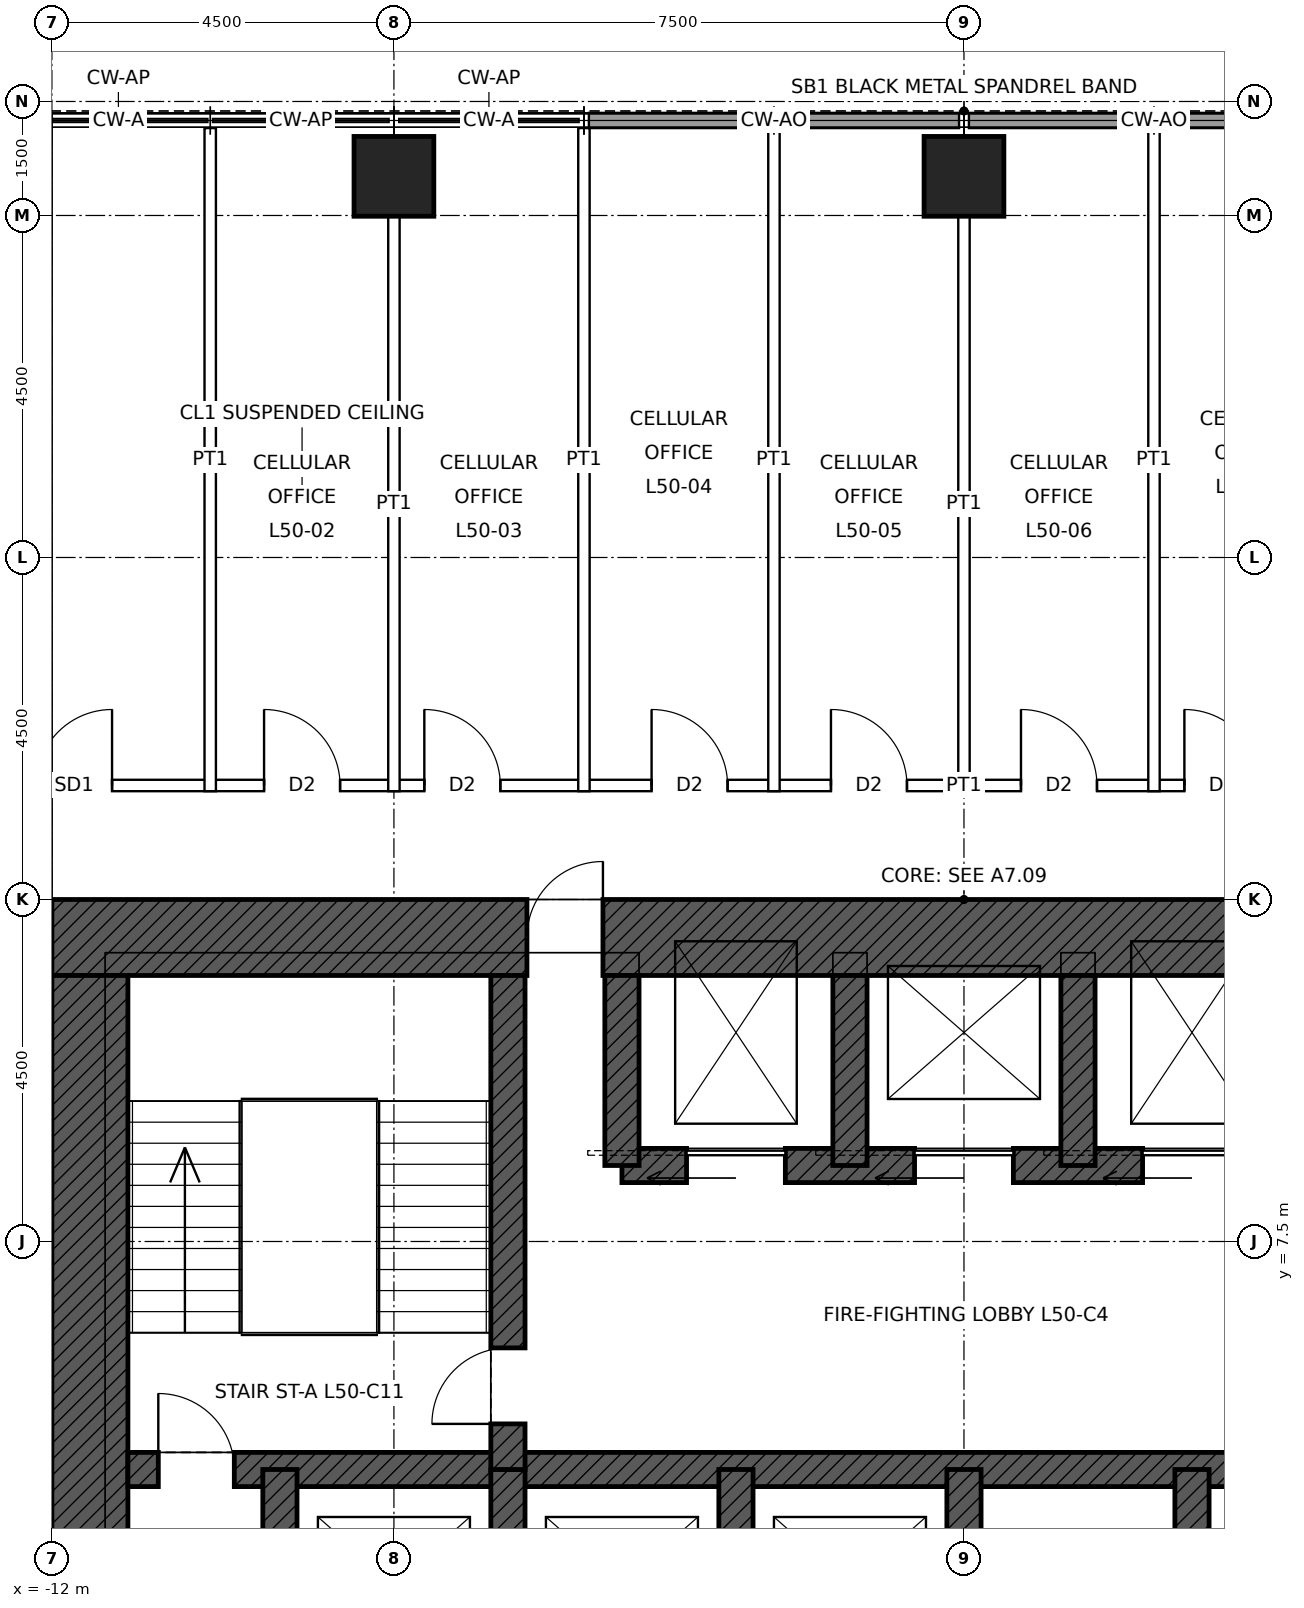
"""IFC4 building model, lengths in metres.
Left out: names, types, materials, properties, quantities, classifications, styles, units other than length and angle.
Written with IfcOpenShell. Run it as: python <this file> out.ifc"""

import sys

from ifc_helpers import new_model, si_unit, direction, frame, frame_2d, origin, origin_2d, place, context, subcontext, project, spatial, rectangle, hollow_rectangle, extrude, element, fill, save


model = new_model("IFC4")
c1 = context("Model", 3, precision=1e-05, world=origin(), true_north=direction((0.0, 1.0)))
c2 = subcontext(c1, "Body", "Model", "MODEL_VIEW")
j1 = project(units=[si_unit("LENGTHUNIT", "METRE"), si_unit("PLANEANGLEUNIT", "RADIAN")], contexts=[c1])
p1 = place(None, origin())
s1 = spatial("IfcSite", under=j1, at=p1, CompositionType="ELEMENT")
p2 = place(p1, origin())
s2 = spatial("IfcBuilding", under=s1, at=p2, CompositionType="ELEMENT")
p3 = place(p2, frame((0.0, 0.0, 233.9)))
s3 = spatial("IfcBuildingStorey", under=s2, at=p3, CompositionType="ELEMENT", Elevation=233.9)
for number, where, z_axis, x_axis in (
    (1, (-7.5, 21.515, 0.0), (0.0, 0.0, 1.0), (1.0, 0.0, 0.0)),
    (2, (0.0, 21.515, 0.0), (0.0, 0.0, 1.0), (1.0, 0.0, 0.0)),
):
    element("IfcColumn", number, at=place(p3, frame(where, z_axis=z_axis, x_axis=x_axis)), inside=s3, PredefinedType="COLUMN", context=c2, shape_type="SweptSolid", body=[
        extrude(hollow_rectangle(XDim=1.05, YDim=1.05, WallThickness=0.07, at=origin_2d()), origin(), (0.0, 0.0, 1.0), 4.0),
    ])
p4 = place(p3, frame((-12.0, 11.5, 0.0), z_axis=(0.0, 0.0, 1.0), x_axis=(1.0, 0.0, 0.0)))
e3 = element("IfcWall", 3, at=p4, inside=s3, PredefinedType="SHEAR", context=c2, shape_type="SweptSolid", body=[
    extrude(rectangle(XDim=24.0, YDim=1.0, at=frame_2d((12.0, 0.0))), origin(), (0.0, 0.0, 1.0), 4.0),
])
p5 = place(p4, frame((6.25, 0.0, 0.0)))
e4 = element("IfcOpeningElement", 4, at=p5, cuts=e3, PredefinedType="OPENING", context=c2, shape_type="SweptSolid", body=[
    extrude(rectangle(XDim=1.0, YDim=2.4, at=frame_2d((0.5, 1.2))), frame((0.0, 0.51, 0.0), z_axis=(0.0, -1.0, 0.0), x_axis=(1.0, 0.0, 0.0)), (0.0, 0.0, 1.0), 1.02),
])
p6 = place(p4, frame((16.75, 0.0, 0.0)))
e5 = element("IfcOpeningElement", 5, at=p6, cuts=e3, PredefinedType="OPENING", context=c2, shape_type="SweptSolid", body=[
    extrude(rectangle(XDim=1.0, YDim=2.4, at=frame_2d((0.5, 1.2))), frame((0.0, 0.51, 0.0), z_axis=(0.0, -1.0, 0.0), x_axis=(1.0, 0.0, 0.0)), (0.0, 0.0, 1.0), 1.02),
])
p7 = place(p3, frame((-11.5, -11.0, 0.0), z_axis=(0.0, 0.0, 1.0), x_axis=(0.0, 1.0, 0.0)))
e6 = element("IfcWall", 6, at=p7, inside=s3, PredefinedType="SHEAR", context=c2, shape_type="SweptSolid", body=[
    extrude(rectangle(XDim=22.0, YDim=1.0, at=frame_2d((11.0, 0.0))), origin(), (0.0, 0.0, 1.0), 4.0),
])
p8 = place(p7, frame((10.5, 0.0, 0.0)))
e7 = element("IfcOpeningElement", 7, at=p8, cuts=e6, PredefinedType="OPENING", context=c2, shape_type="SweptSolid", body=[
    extrude(rectangle(XDim=1.0, YDim=2.4, at=frame_2d((0.5, 1.2))), frame((0.0, 0.51, 0.0), z_axis=(0.0, -1.0, 0.0), x_axis=(1.0, 0.0, 0.0)), (0.0, 0.0, 1.0), 1.02),
])
p9 = place(p3, frame((-11.0, 4.5, 0.0), z_axis=(0.0, 0.0, 1.0), x_axis=(1.0, 0.0, 0.0)))
e8 = element("IfcWall", 8, at=p9, inside=s3, PredefinedType="SHEAR", context=c2, shape_type="SweptSolid", body=[
    extrude(rectangle(XDim=22.0, YDim=0.45, at=frame_2d((11.0, 0.0))), origin(), (0.0, 0.0, 1.0), 4.0),
])
p10 = place(p9, frame((0.4, 0.0, 0.0)))
e9 = element("IfcOpeningElement", 9, at=p10, cuts=e8, PredefinedType="OPENING", context=c2, shape_type="SweptSolid", body=[
    extrude(rectangle(XDim=1.0, YDim=2.1, at=frame_2d((0.5, 1.05))), frame((0.0, 0.235, 0.0), z_axis=(0.0, -1.0, 0.0), x_axis=(1.0, 0.0, 0.0)), (0.0, 0.0, 1.0), 0.47),
])
p11 = place(p9, frame((20.6, 0.0, 0.0)))
e10 = element("IfcOpeningElement", 10, at=p11, cuts=e8, PredefinedType="OPENING", context=c2, shape_type="SweptSolid", body=[
    extrude(rectangle(XDim=1.0, YDim=2.1, at=frame_2d((0.5, 1.05))), frame((0.0, 0.235, 0.0), z_axis=(0.0, -1.0, 0.0), x_axis=(1.0, 0.0, 0.0)), (0.0, 0.0, 1.0), 0.47),
])
p12 = place(p3, frame((-4.5, 8.5, 0.0), z_axis=(0.0, 0.0, 1.0), x_axis=(1.0, 0.0, 0.0)))
e11 = element("IfcWall", 11, at=p12, inside=s3, PredefinedType="SHEAR", context=c2, shape_type="SweptSolid", body=[
    extrude(rectangle(XDim=9.0, YDim=0.45, at=frame_2d((4.5, 0.0))), origin(), (0.0, 0.0, 1.0), 4.0),
])
p13 = place(p12, frame((0.85, 0.0, 0.0)))
e12 = element("IfcOpeningElement", 12, at=p13, cuts=e11, PredefinedType="OPENING", context=c2, shape_type="SweptSolid", body=[
    extrude(rectangle(XDim=1.3, YDim=2.4, at=frame_2d((0.65, 1.2))), frame((0.0, 0.235, 0.0), z_axis=(0.0, -1.0, 0.0), x_axis=(1.0, 0.0, 0.0)), (0.0, 0.0, 1.0), 0.47),
])
p14 = place(p12, frame((6.85, 0.0, 0.0)))
e13 = element("IfcOpeningElement", 13, at=p14, cuts=e11, PredefinedType="OPENING", context=c2, shape_type="SweptSolid", body=[
    extrude(rectangle(XDim=1.3, YDim=2.4, at=frame_2d((0.65, 1.2))), frame((0.0, 0.235, 0.0), z_axis=(0.0, -1.0, 0.0), x_axis=(1.0, 0.0, 0.0)), (0.0, 0.0, 1.0), 0.47),
])
p15 = place(p12, frame((3.85, 0.0, 0.0)))
e14 = element("IfcOpeningElement", 14, at=p15, cuts=e11, PredefinedType="OPENING", context=c2, shape_type="SweptSolid", body=[
    extrude(rectangle(XDim=1.3, YDim=2.4, at=frame_2d((0.65, 1.2))), frame((0.0, 0.235, 0.0), z_axis=(0.0, -1.0, 0.0), x_axis=(1.0, 0.0, 0.0)), (0.0, 0.0, 1.0), 0.47),
])
for number, where, z_axis, x_axis in (
    (15, (-9.0, 1.5, 0.0), (0.0, 0.0, 1.0), (0.0, 1.0, 0.0)),
    (16, (-6.0, 1.5, 0.0), (0.0, 0.0, 1.0), (0.0, 1.0, 0.0)),
    (17, (-3.0, 1.5, 0.0), (0.0, 0.0, 1.0), (0.0, 1.0, 0.0)),
    (18, (0.0, 1.5, 0.0), (0.0, 0.0, 1.0), (0.0, 1.0, 0.0)),
    (19, (3.0, 1.5, 0.0), (0.0, 0.0, 1.0), (0.0, 1.0, 0.0)),
):
    element("IfcWall", number, at=place(p3, frame(where, z_axis=z_axis, x_axis=x_axis)), inside=s3, PredefinedType="SHEAR", context=c2, shape_type="SweptSolid", body=[
        extrude(rectangle(XDim=3.0, YDim=0.45, at=frame_2d((1.5, 0.0))), origin(), (0.0, 0.0, 1.0), 4.0),
    ])
p16 = place(p3, frame((-6.0, 4.5, 0.0), z_axis=(0.0, 0.0, 1.0), x_axis=(0.0, 1.0, 0.0)))
e20 = element("IfcWall", 20, at=p16, inside=s3, PredefinedType="SHEAR", context=c2, shape_type="SweptSolid", body=[
    extrude(rectangle(XDim=6.5, YDim=0.45, at=frame_2d((3.25, 0.0))), origin(), (0.0, 0.0, 1.0), 4.0),
])
p17 = place(p16, frame((0.6, 0.0, 0.0)))
e21 = element("IfcOpeningElement", 21, at=p17, cuts=e20, PredefinedType="OPENING", context=c2, shape_type="SweptSolid", body=[
    extrude(rectangle(XDim=1.0, YDim=2.1, at=frame_2d((0.5, 1.05))), frame((0.0, 0.235, 0.0), z_axis=(0.0, -1.0, 0.0), x_axis=(1.0, 0.0, 0.0)), (0.0, 0.0, 1.0), 0.47),
])
for number, where, z_axis, x_axis in (
    (22, (-4.5, 8.5, 0.0), (0.0, 0.0, 1.0), (0.0, 1.0, 0.0)),
    (23, (-1.5, 8.5, 0.0), (0.0, 0.0, 1.0), (0.0, 1.0, 0.0)),
    (24, (1.5, 8.5, 0.0), (0.0, 0.0, 1.0), (0.0, 1.0, 0.0)),
):
    element("IfcWall", number, at=place(p3, frame(where, z_axis=z_axis, x_axis=x_axis)), inside=s3, PredefinedType="SHEAR", context=c2, shape_type="SweptSolid", body=[
        extrude(rectangle(XDim=2.5, YDim=0.45, at=frame_2d((1.25, 0.0))), origin(), (0.0, 0.0, 1.0), 4.0),
    ])
for number, where, z_axis, x_axis in (
    (25, (-4.935, 22.25, 0.0), (0.0, 0.0, 1.0), (1.0, 0.0, 0.0)),
    (26, (-2.468, 22.25, 0.0), (0.0, 0.0, 1.0), (1.0, 0.0, 0.0)),
    (27, (0.065, 22.25, 0.0), (0.0, 0.0, 1.0), (1.0, 0.0, 0.0)),
    (28, (2.532, 22.25, 0.0), (0.0, 0.0, 1.0), (1.0, 0.0, 0.0)),
):
    element("IfcWall", number, at=place(p3, frame(where, z_axis=z_axis, x_axis=x_axis)), inside=s3, PredefinedType="SOLIDWALL", context=c2, shape_type="SweptSolid", body=[
        extrude(rectangle(XDim=2.403, YDim=0.2, at=frame_2d((1.201, 0.0))), origin(), (0.0, 0.0, 1.0), 3.85),
    ])
p18 = place(p3, frame((-13.575, 13.5, 0.0), z_axis=(0.0, 0.0, 1.0), x_axis=(1.0, 0.0, 0.0)))
e29 = element("IfcWall", 29, at=p18, inside=s3, PredefinedType="PARTITIONING", context=c2, shape_type="SweptSolid", body=[
    extrude(rectangle(XDim=27.15, YDim=0.15, at=frame_2d((13.575, 0.0))), origin(), (0.0, 0.0, 1.0), 3.85),
])
p19 = place(p18, frame((4.366, 0.0, 0.0)))
e30 = element("IfcOpeningElement", 30, at=p19, cuts=e29, PredefinedType="OPENING", context=c2, shape_type="SweptSolid", body=[
    extrude(rectangle(XDim=1.0, YDim=2.1, at=frame_2d((0.5, 1.05))), frame((0.0, 0.085, 0.0), z_axis=(0.0, -1.0, 0.0), x_axis=(1.0, 0.0, 0.0)), (0.0, 0.0, 1.0), 0.17),
])
p20 = place(p18, frame((6.475, 0.0, 0.0)))
e31 = element("IfcOpeningElement", 31, at=p20, cuts=e29, PredefinedType="OPENING", context=c2, shape_type="SweptSolid", body=[
    extrude(rectangle(XDim=1.0, YDim=2.1, at=frame_2d((0.5, 1.05))), frame((0.0, 0.085, 0.0), z_axis=(0.0, -1.0, 0.0), x_axis=(1.0, 0.0, 0.0)), (0.0, 0.0, 1.0), 0.17),
])
p21 = place(p18, frame((9.465, 0.0, 0.0)))
e32 = element("IfcOpeningElement", 32, at=p21, cuts=e29, PredefinedType="OPENING", context=c2, shape_type="SweptSolid", body=[
    extrude(rectangle(XDim=1.0, YDim=2.1, at=frame_2d((0.5, 1.05))), frame((0.0, 0.085, 0.0), z_axis=(0.0, -1.0, 0.0), x_axis=(1.0, 0.0, 0.0)), (0.0, 0.0, 1.0), 0.17),
])
p22 = place(p18, frame((11.825, 0.0, 0.0)))
e33 = element("IfcOpeningElement", 33, at=p22, cuts=e29, PredefinedType="OPENING", context=c2, shape_type="SweptSolid", body=[
    extrude(rectangle(XDim=1.0, YDim=2.1, at=frame_2d((0.5, 1.05))), frame((0.0, 0.085, 0.0), z_axis=(0.0, -1.0, 0.0), x_axis=(1.0, 0.0, 0.0)), (0.0, 0.0, 1.0), 0.17),
])
p23 = place(p18, frame((14.325, 0.0, 0.0)))
e34 = element("IfcOpeningElement", 34, at=p23, cuts=e29, PredefinedType="OPENING", context=c2, shape_type="SweptSolid", body=[
    extrude(rectangle(XDim=1.0, YDim=2.1, at=frame_2d((0.5, 1.05))), frame((0.0, 0.085, 0.0), z_axis=(0.0, -1.0, 0.0), x_axis=(1.0, 0.0, 0.0)), (0.0, 0.0, 1.0), 0.17),
])
p24 = place(p18, frame((16.475, 0.0, 0.0)))
e35 = element("IfcOpeningElement", 35, at=p24, cuts=e29, PredefinedType="OPENING", context=c2, shape_type="SweptSolid", body=[
    extrude(rectangle(XDim=1.0, YDim=2.1, at=frame_2d((0.5, 1.05))), frame((0.0, 0.085, 0.0), z_axis=(0.0, -1.0, 0.0), x_axis=(1.0, 0.0, 0.0)), (0.0, 0.0, 1.0), 0.17),
])
p25 = place(p18, frame((19.675, 0.0, 0.0)))
e36 = element("IfcOpeningElement", 36, at=p25, cuts=e29, PredefinedType="OPENING", context=c2, shape_type="SweptSolid", body=[
    extrude(rectangle(XDim=1.0, YDim=2.1, at=frame_2d((0.5, 1.05))), frame((0.0, 0.085, 0.0), z_axis=(0.0, -1.0, 0.0), x_axis=(1.0, 0.0, 0.0)), (0.0, 0.0, 1.0), 0.17),
])
p26 = place(p18, frame((21.783, 0.0, 0.0)))
e37 = element("IfcOpeningElement", 37, at=p26, cuts=e29, PredefinedType="OPENING", context=c2, shape_type="SweptSolid", body=[
    extrude(rectangle(XDim=1.0, YDim=2.1, at=frame_2d((0.5, 1.05))), frame((0.0, 0.085, 0.0), z_axis=(0.0, -1.0, 0.0), x_axis=(1.0, 0.0, 0.0)), (0.0, 0.0, 1.0), 0.17),
])
p27 = place(p18, frame((24.783, 0.0, 0.0)))
e38 = element("IfcOpeningElement", 38, at=p27, cuts=e29, PredefinedType="OPENING", context=c2, shape_type="SweptSolid", body=[
    extrude(rectangle(XDim=1.0, YDim=2.4, at=frame_2d((0.5, 1.2))), frame((0.0, 0.085, 0.0), z_axis=(0.0, -1.0, 0.0), x_axis=(1.0, 0.0, 0.0)), (0.0, 0.0, 1.0), 0.17),
])
p28 = place(p18, frame((1.366, 0.0, 0.0)))
e39 = element("IfcOpeningElement", 39, at=p28, cuts=e29, PredefinedType="OPENING", context=c2, shape_type="SweptSolid", body=[
    extrude(rectangle(XDim=1.0, YDim=2.4, at=frame_2d((0.5, 1.2))), frame((0.0, 0.085, 0.0), z_axis=(0.0, -1.0, 0.0), x_axis=(1.0, 0.0, 0.0)), (0.0, 0.0, 1.0), 0.17),
])
p29 = place(p3, frame((-9.917, 13.425, 0.0), z_axis=(0.0, 0.0, 1.0), x_axis=(0.0, 1.0, 0.0)))
e40 = element("IfcWall", 40, at=p29, inside=s3, PredefinedType="PARTITIONING", context=c2, shape_type="SweptSolid", body=[
    extrude(rectangle(XDim=8.725, YDim=0.15, at=frame_2d((4.362, 0.0))), origin(), (0.0, 0.0, 1.0), 3.85),
])
p30 = place(p3, frame((-7.5, 13.425, 0.0), z_axis=(0.0, 0.0, 1.0), x_axis=(0.0, 1.0, 0.0)))
e41 = element("IfcWall", 41, at=p30, inside=s3, PredefinedType="PARTITIONING", context=c2, shape_type="SweptSolid", body=[
    extrude(rectangle(XDim=7.565, YDim=0.15, at=frame_2d((3.782, 0.0))), origin(), (0.0, 0.0, 1.0), 3.238),
])
for number, where, z_axis, x_axis in (
    (42, (-5.0, 13.425, 0.0), (0.0, 0.0, 1.0), (0.0, 1.0, 0.0)),
    (43, (-2.5, 13.425, 0.0), (0.0, 0.0, 1.0), (0.0, 1.0, 0.0)),
):
    element("IfcWall", number, at=place(p3, frame(where, z_axis=z_axis, x_axis=x_axis)), inside=s3, PredefinedType="PARTITIONING", context=c2, shape_type="SweptSolid", body=[
        extrude(rectangle(XDim=8.725, YDim=0.15, at=frame_2d((4.362, 0.0))), origin(), (0.0, 0.0, 1.0), 3.85),
    ])
p31 = place(p3, frame((0.0, 13.425, 0.0), z_axis=(0.0, 0.0, 1.0), x_axis=(0.0, 1.0, 0.0)))
e44 = element("IfcWall", 44, at=p31, inside=s3, PredefinedType="PARTITIONING", context=c2, shape_type="SweptSolid", body=[
    extrude(rectangle(XDim=7.565, YDim=0.15, at=frame_2d((3.782, 0.0))), origin(), (0.0, 0.0, 1.0), 3.238),
])
p32 = place(p3, frame((2.5, 13.425, 0.0), z_axis=(0.0, 0.0, 1.0), x_axis=(0.0, 1.0, 0.0)))
e45 = element("IfcWall", 45, at=p32, inside=s3, PredefinedType="PARTITIONING", context=c2, shape_type="SweptSolid", body=[
    extrude(rectangle(XDim=8.725, YDim=0.15, at=frame_2d((4.362, 0.0))), origin(), (0.0, 0.0, 1.0), 3.85),
])
p33 = place(p10, origin())
e46 = element("IfcDoor", 46, at=p33, inside=s3, OperationType="SINGLE_SWING_LEFT", PredefinedType="DOOR", context=c2, shape_type="SweptSolid", body=[
    extrude(rectangle(XDim=1.0, YDim=2.1, at=frame_2d((0.5, 1.05))), frame((0.0, 0.025, 0.0), z_axis=(0.0, -1.0, 0.0), x_axis=(1.0, 0.0, 0.0)), (0.0, 0.0, 1.0), 0.05),
])
fill(e9, e46)
p34 = place(p17, origin())
e47 = element("IfcDoor", 47, at=p34, inside=s3, OperationType="SINGLE_SWING_LEFT", PredefinedType="DOOR", context=c2, shape_type="SweptSolid", body=[
    extrude(rectangle(XDim=1.0, YDim=2.1, at=frame_2d((0.5, 1.05))), frame((0.0, 0.025, 0.0), z_axis=(0.0, -1.0, 0.0), x_axis=(1.0, 0.0, 0.0)), (0.0, 0.0, 1.0), 0.05),
])
fill(e21, e47)
p35 = place(p5, origin())
e48 = element("IfcDoor", 48, at=p35, inside=s3, OperationType="SINGLE_SWING_RIGHT", PredefinedType="DOOR", context=c2, shape_type="SweptSolid", body=[
    extrude(rectangle(XDim=1.0, YDim=2.4, at=frame_2d((0.5, 1.2))), frame((0.0, 0.485, 0.0), z_axis=(0.0, -1.0, 0.0), x_axis=(1.0, 0.0, 0.0)), (0.0, 0.0, 1.0), 0.05),
])
fill(e4, e48)
p36 = place(p13, origin())
e49 = element("IfcDoor", 49, at=p36, inside=s3, OperationType="SLIDING_TO_LEFT", PredefinedType="DOOR", context=c2, shape_type="SweptSolid", body=[
    extrude(rectangle(XDim=1.3, YDim=2.4, at=frame_2d((0.65, 1.2))), frame((0.0, 0.025, 0.0), z_axis=(0.0, -1.0, 0.0), x_axis=(1.0, 0.0, 0.0)), (0.0, 0.0, 1.0), 0.05),
])
fill(e12, e49)
p37 = place(p14, origin())
e50 = element("IfcDoor", 50, at=p37, inside=s3, OperationType="SLIDING_TO_LEFT", PredefinedType="DOOR", context=c2, shape_type="SweptSolid", body=[
    extrude(rectangle(XDim=1.3, YDim=2.4, at=frame_2d((0.65, 1.2))), frame((0.0, 0.025, 0.0), z_axis=(0.0, -1.0, 0.0), x_axis=(1.0, 0.0, 0.0)), (0.0, 0.0, 1.0), 0.05),
])
fill(e13, e50)
p38 = place(p15, origin())
e51 = element("IfcDoor", 51, at=p38, inside=s3, OperationType="SLIDING_TO_LEFT", PredefinedType="DOOR", context=c2, shape_type="SweptSolid", body=[
    extrude(rectangle(XDim=1.3, YDim=2.4, at=frame_2d((0.65, 1.2))), frame((0.0, 0.025, 0.0), z_axis=(0.0, -1.0, 0.0), x_axis=(1.0, 0.0, 0.0)), (0.0, 0.0, 1.0), 0.05),
])
fill(e14, e51)
p39 = place(p19, origin())
e52 = element("IfcDoor", 52, at=p39, inside=s3, OperationType="SINGLE_SWING_LEFT", PredefinedType="DOOR", context=c2, shape_type="SweptSolid", body=[
    extrude(rectangle(XDim=1.0, YDim=2.1, at=frame_2d((0.5, 1.05))), frame((0.0, 0.025, 0.0), z_axis=(0.0, -1.0, 0.0), x_axis=(1.0, 0.0, 0.0)), (0.0, 0.0, 1.0), 0.05),
])
fill(e30, e52)
p40 = place(p20, origin())
e53 = element("IfcDoor", 53, at=p40, inside=s3, OperationType="SINGLE_SWING_LEFT", PredefinedType="DOOR", context=c2, shape_type="SweptSolid", body=[
    extrude(rectangle(XDim=1.0, YDim=2.1, at=frame_2d((0.5, 1.05))), frame((0.0, 0.025, 0.0), z_axis=(0.0, -1.0, 0.0), x_axis=(1.0, 0.0, 0.0)), (0.0, 0.0, 1.0), 0.05),
])
fill(e31, e53)
p41 = place(p21, origin())
e54 = element("IfcDoor", 54, at=p41, inside=s3, OperationType="SINGLE_SWING_LEFT", PredefinedType="DOOR", context=c2, shape_type="SweptSolid", body=[
    extrude(rectangle(XDim=1.0, YDim=2.1, at=frame_2d((0.5, 1.05))), frame((0.0, 0.025, 0.0), z_axis=(0.0, -1.0, 0.0), x_axis=(1.0, 0.0, 0.0)), (0.0, 0.0, 1.0), 0.05),
])
fill(e32, e54)
p42 = place(p22, origin())
e55 = element("IfcDoor", 55, at=p42, inside=s3, OperationType="SINGLE_SWING_LEFT", PredefinedType="DOOR", context=c2, shape_type="SweptSolid", body=[
    extrude(rectangle(XDim=1.0, YDim=2.1, at=frame_2d((0.5, 1.05))), frame((0.0, 0.025, 0.0), z_axis=(0.0, -1.0, 0.0), x_axis=(1.0, 0.0, 0.0)), (0.0, 0.0, 1.0), 0.05),
])
fill(e33, e55)
p43 = place(p23, origin())
e56 = element("IfcDoor", 56, at=p43, inside=s3, OperationType="SINGLE_SWING_LEFT", PredefinedType="DOOR", context=c2, shape_type="SweptSolid", body=[
    extrude(rectangle(XDim=1.0, YDim=2.1, at=frame_2d((0.5, 1.05))), frame((0.0, 0.025, 0.0), z_axis=(0.0, -1.0, 0.0), x_axis=(1.0, 0.0, 0.0)), (0.0, 0.0, 1.0), 0.05),
])
fill(e34, e56)
p44 = place(p24, origin())
e57 = element("IfcDoor", 57, at=p44, inside=s3, OperationType="SINGLE_SWING_LEFT", PredefinedType="DOOR", context=c2, shape_type="SweptSolid", body=[
    extrude(rectangle(XDim=1.0, YDim=2.1, at=frame_2d((0.5, 1.05))), frame((0.0, 0.025, 0.0), z_axis=(0.0, -1.0, 0.0), x_axis=(1.0, 0.0, 0.0)), (0.0, 0.0, 1.0), 0.05),
])
fill(e35, e57)
p45 = place(p28, origin())
e58 = element("IfcDoor", 58, at=p45, inside=s3, OperationType="SINGLE_SWING_RIGHT", PredefinedType="DOOR", context=c2, shape_type="SweptSolid", body=[
    extrude(rectangle(XDim=1.0, YDim=2.4, at=frame_2d((0.5, 1.2))), frame((0.0, 0.025, 0.0), z_axis=(0.0, -1.0, 0.0), x_axis=(1.0, 0.0, 0.0)), (0.0, 0.0, 1.0), 0.05),
])
fill(e39, e58)
save(model, sys.argv[1])
